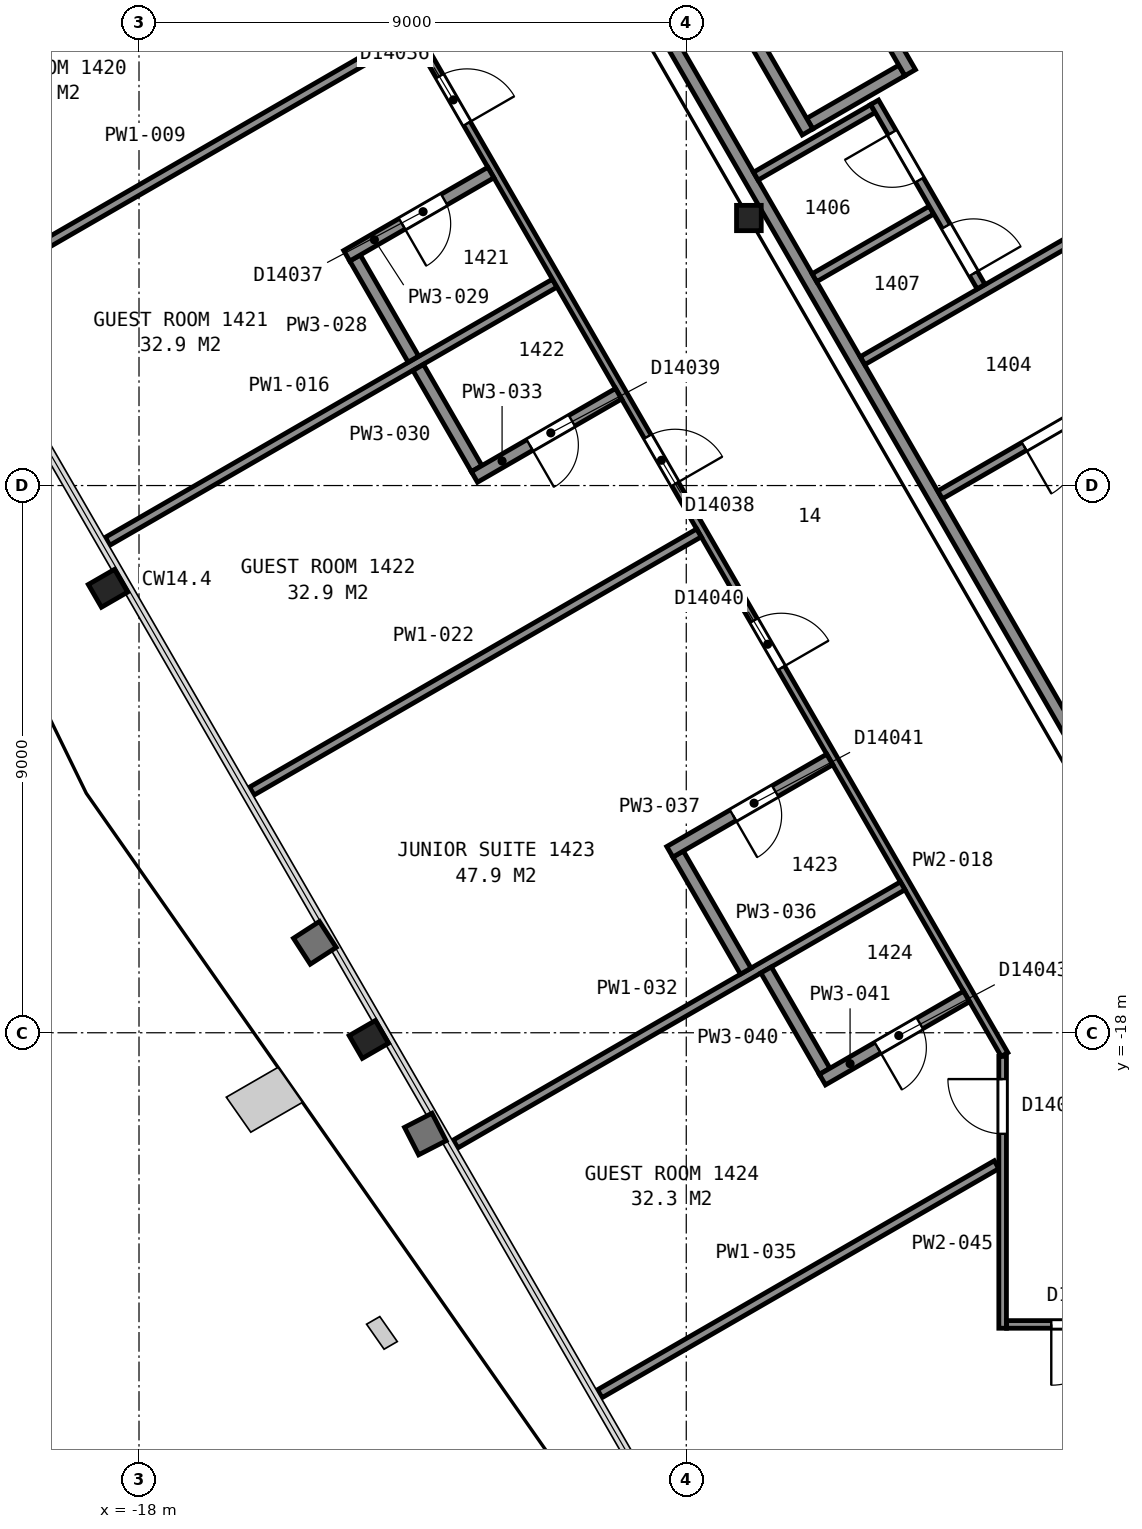
"""IFC4 building model, lengths in metres.
Left out: names, types, materials, properties, quantities, classifications, styles, units other than length and angle.
Written with IfcOpenShell. Run it as: python <this file> out.ifc"""

import sys

from ifc_helpers import new_model, si_unit, direction, frame, frame_2d, origin, origin_2d, place, context, subcontext, project, spatial, rectangle, i_section, extrude, element, fill, save


model = new_model("IFC4")
c1 = context("Model", 3, precision=1e-05, world=origin(), true_north=direction((0.0, 1.0)))
c2 = subcontext(c1, "Body", "Model", "MODEL_VIEW")
j1 = project(units=[si_unit("LENGTHUNIT", "METRE"), si_unit("PLANEANGLEUNIT", "RADIAN")], contexts=[c1])
p1 = place(None, origin())
s1 = spatial("IfcSite", under=j1, at=p1, CompositionType="ELEMENT")
p2 = place(p1, origin())
s2 = spatial("IfcBuilding", under=s1, at=p2, CompositionType="ELEMENT")
p3 = place(p2, frame((0.0, 0.0, 65.6)))
s3 = spatial("IfcBuildingStorey", under=s2, at=p3, CompositionType="ELEMENT", Elevation=65.6)
for number, where, z_axis, x_axis in (
    (1, (-18.51, -10.69, 0.025), (0.0, 0.0, 1.0), (-0.5, 0.866, 0.0)),
    (2, (-14.22, -18.11, 0.025), (0.0, 0.0, 1.0), (-0.5, 0.866, 0.0)),
):
    element("IfcColumn", number, at=place(p3, frame(where, z_axis=z_axis, x_axis=x_axis)), inside=s3, PredefinedType="COLUMN", context=c2, shape_type="SweptSolid", body=[
        extrude(i_section(OverallWidth=0.432, OverallDepth=0.498, WebThickness=0.056, FlangeThickness=0.089, FilletRadius=0.015, at=origin_2d()), origin(), (0.0, 0.0, 1.0), 3.575),
    ])
p4 = place(p3, frame((-7.97, -4.6, 0.0), z_axis=(0.0, 0.0, 1.0), x_axis=(1.0, 0.0, 0.0)))
e3 = element("IfcColumn", 3, at=p4, inside=s3, PredefinedType="COLUMN", context=c2, shape_type="SweptSolid", body=[
    extrude(i_section(OverallWidth=0.406, OverallDepth=0.417, WebThickness=0.03, FlangeThickness=0.048, FilletRadius=0.015, at=origin_2d()), origin(), (0.0, 0.0, 1.0), 3.6),
])
p5 = place(p3, frame((-6.97, -3.048, 0.0), z_axis=(0.0, 0.0, 1.0), x_axis=(0.866036909293, 0.499980071345, 0.0)))
e4 = element("IfcWall", 4, at=p5, inside=s3, PredefinedType="PARTITIONING", context=c2, shape_type="SweptSolid", body=[
    extrude(rectangle(XDim=1.75, YDim=0.2, at=frame_2d((0.875, 0.0))), origin(), (0.0, 0.0, 1.0), 3.6),
])
p6 = place(p3, frame((-5.318, -2.21, 0.0), z_axis=(0.0, 0.0, 1.0), x_axis=(-0.499938297808, 0.866061024631, 0.0)))
e5 = element("IfcWall", 5, at=p6, inside=s3, PredefinedType="PARTITIONING", context=c2, shape_type="SweptSolid", body=[
    extrude(rectangle(XDim=2.35, YDim=0.2, at=frame_2d((1.175, 0.0))), origin(), (0.0, 0.0, 1.0), 3.6),
])
p7 = place(p3, frame((-7.006, -3.185, 0.0), z_axis=(0.0, 0.0, 1.0), x_axis=(-0.499990435942, 0.866030925526, 0.0)))
e6 = element("IfcWall", 6, at=p7, inside=s3, PredefinedType="PARTITIONING", context=c2, shape_type="SweptSolid", body=[
    extrude(rectangle(XDim=2.55, YDim=0.2, at=frame_2d((1.275, 0.0))), origin(), (0.0, 0.0, 1.0), 3.6),
])
p8 = place(p3, frame((-13.664, 5.946, 0.0), z_axis=(0.0, 0.0, 1.0), x_axis=(0.499994327219, -0.866028678941, 0.0)))
e7 = element("IfcWall", 7, at=p8, inside=s3, PredefinedType="PARTITIONING", context=c2, shape_type="SweptSolid", body=[
    extrude(rectangle(XDim=23.968, YDim=0.2, at=frame_2d((11.984, 0.0))), origin(), (0.0, 0.0, 1.0), 3.35),
])
p9 = place(p3, frame((-7.856, -3.912, 0.0), z_axis=(0.0, 0.0, 1.0), x_axis=(0.865971748, 0.500092923031, 0.0)))
e8 = element("IfcWall", 8, at=p9, inside=s3, PredefinedType="PARTITIONING", context=c2, shape_type="SweptSolid", body=[
    extrude(rectangle(XDim=2.225, YDim=0.15, at=frame_2d((1.112, 0.0))), origin(), (0.0, 0.0, 1.0), 3.35),
])
p10 = place(p3, frame((-6.892, -5.582, 0.0), z_axis=(0.0, 0.0, 1.0), x_axis=(0.865944298464, 0.500140452231, 0.0)))
e9 = element("IfcWall", 9, at=p10, inside=s3, PredefinedType="PARTITIONING", context=c2, shape_type="SweptSolid", body=[
    extrude(rectangle(XDim=2.224, YDim=0.15, at=frame_2d((1.112, 0.0))), origin(), (0.0, 0.0, 1.0), 3.35),
])
p11 = place(p3, frame((-6.1, -6.946, 0.0), z_axis=(0.0, 0.0, 1.0), x_axis=(0.866038200431, 0.499977834903, 0.0)))
e10 = element("IfcWall", 10, at=p11, inside=s3, PredefinedType="PARTITIONING", context=c2, shape_type="SweptSolid", body=[
    extrude(rectangle(XDim=4.22, YDim=0.15, at=frame_2d((2.11, 0.0))), origin(), (0.0, 0.0, 1.0), 3.35),
])
p12 = place(p3, frame((-4.152, -5.729, 0.0), z_axis=(0.0, 0.0, 1.0), x_axis=(-0.500024287448, 0.866011380966, 0.0)))
e11 = element("IfcWall", 11, at=p12, inside=s3, PredefinedType="PARTITIONING", context=c2, shape_type="SweptSolid", body=[
    extrude(rectangle(XDim=3.501, YDim=0.15, at=frame_2d((1.75, 0.0))), origin(), (0.0, 0.0, 1.0), 3.35),
])
p13 = place(p12, frame((2.026, 0.0, 0.0)))
e12 = element("IfcOpeningElement", 12, at=p13, cuts=e11, PredefinedType="OPENING", context=c2, shape_type="SweptSolid", body=[
    extrude(rectangle(XDim=0.9, YDim=2.1, at=frame_2d((0.45, 1.05))), frame((0.0, 0.085, 0.0), z_axis=(0.0, -1.0, 0.0), x_axis=(1.0, 0.0, 0.0)), (0.0, 0.0, 1.0), 0.17),
])
p14 = place(p12, frame((0.248, 0.0, 0.0)))
e13 = element("IfcOpeningElement", 13, at=p14, cuts=e11, PredefinedType="OPENING", context=c2, shape_type="SweptSolid", body=[
    extrude(rectangle(XDim=0.9, YDim=2.1, at=frame_2d((0.45, 1.05))), frame((0.0, 0.085, 0.0), z_axis=(0.0, -1.0, 0.0), x_axis=(1.0, 0.0, 0.0)), (0.0, 0.0, 1.0), 0.17),
])
p15 = place(p3, frame((-4.825, -9.154, 0.0), z_axis=(0.0, 0.0, 1.0), x_axis=(0.866023738697, 0.500002884005, 0.0)))
e14 = element("IfcWall", 14, at=p15, inside=s3, PredefinedType="PARTITIONING", context=c2, shape_type="SweptSolid", body=[
    extrude(rectangle(XDim=4.22, YDim=0.15, at=frame_2d((2.11, 0.0))), origin(), (0.0, 0.0, 1.0), 3.35),
])
p16 = place(p15, frame((1.595, 0.0, 0.0)))
e15 = element("IfcOpeningElement", 15, at=p16, cuts=e14, PredefinedType="OPENING", context=c2, shape_type="SweptSolid", body=[
    extrude(rectangle(XDim=0.9, YDim=2.1, at=frame_2d((0.45, 1.05))), frame((0.0, 0.085, 0.0), z_axis=(0.0, -1.0, 0.0), x_axis=(1.0, 0.0, 0.0)), (0.0, 0.0, 1.0), 0.17),
])
p17 = place(p3, frame((-20.889, -5.809, 0.0), z_axis=(0.0, 0.0, 1.0), x_axis=(0.866022790583, 0.50000452617, 0.0)))
e16 = element("IfcWall", 16, at=p17, inside=s3, PredefinedType="PARTITIONING", context=c2, shape_type="SweptSolid", body=[
    extrude(rectangle(XDim=8.491, YDim=0.15, at=frame_2d((4.246, 0.0))), origin(), (0.0, 0.0, 1.0), 2.613),
])
p18 = place(p3, frame((-18.517, -9.917, 0.0), z_axis=(0.0, 0.0, 1.0), x_axis=(0.866017528739, 0.50001363973, 0.0)))
e17 = element("IfcWall", 17, at=p18, inside=s3, PredefinedType="PARTITIONING", context=c2, shape_type="SweptSolid", body=[
    extrude(rectangle(XDim=8.491, YDim=0.15, at=frame_2d((4.246, 0.0))), origin(), (0.0, 0.0, 1.0), 2.613),
])
p19 = place(p3, frame((-3.766, -18.358, 0.0), z_axis=(0.0, 0.0, 1.0), x_axis=(-0.500003973642, 0.866023109589, 0.0)))
e18 = element("IfcWall", 18, at=p19, inside=s3, PredefinedType="PARTITIONING", context=c2, shape_type="SweptSolid", body=[
    extrude(rectangle(XDim=28.826, YDim=0.125, at=frame_2d((14.413, 0.0))), origin(), (0.0, 0.0, 1.0), 2.613),
])
p20 = place(p19, frame((27.114, 0.0, 0.0)))
e19 = element("IfcOpeningElement", 19, at=p20, cuts=e18, PredefinedType="OPENING", context=c2, shape_type="SweptSolid", body=[
    extrude(rectangle(XDim=0.9, YDim=2.1, at=frame_2d((0.45, 1.05))), frame((0.0, 0.073, 0.0), z_axis=(0.0, -1.0, 0.0), x_axis=(1.0, 0.0, 0.0)), (0.0, 0.0, 1.0), 0.145),
])
p21 = place(p19, frame((20.322, 0.0, 0.0)))
e20 = element("IfcOpeningElement", 20, at=p21, cuts=e18, PredefinedType="OPENING", context=c2, shape_type="SweptSolid", body=[
    extrude(rectangle(XDim=0.9, YDim=2.1, at=frame_2d((0.45, 1.05))), frame((0.0, 0.073, 0.0), z_axis=(0.0, -1.0, 0.0), x_axis=(1.0, 0.0, 0.0)), (0.0, 0.0, 1.0), 0.145),
])
p22 = place(p19, frame((17.68, 0.0, 0.0)))
e21 = element("IfcOpeningElement", 21, at=p22, cuts=e18, PredefinedType="OPENING", context=c2, shape_type="SweptSolid", body=[
    extrude(rectangle(XDim=0.9, YDim=2.1, at=frame_2d((0.45, 1.05))), frame((0.0, 0.073, 0.0), z_axis=(0.0, -1.0, 0.0), x_axis=(1.0, 0.0, 0.0)), (0.0, 0.0, 1.0), 0.145),
])
p23 = place(p19, frame((10.836, 0.0, 0.0)))
e22 = element("IfcOpeningElement", 22, at=p23, cuts=e18, PredefinedType="OPENING", context=c2, shape_type="SweptSolid", body=[
    extrude(rectangle(XDim=0.9, YDim=2.1, at=frame_2d((0.45, 1.05))), frame((0.0, 0.073, 0.0), z_axis=(0.0, -1.0, 0.0), x_axis=(1.0, 0.0, 0.0)), (0.0, 0.0, 1.0), 0.145),
])
p24 = place(p19, frame((7.342, 0.0, 0.0)))
e23 = element("IfcOpeningElement", 23, at=p24, cuts=e18, PredefinedType="OPENING", context=c2, shape_type="SweptSolid", body=[
    extrude(rectangle(XDim=0.9, YDim=2.1, at=frame_2d((0.45, 1.05))), frame((0.0, 0.073, 0.0), z_axis=(0.0, -1.0, 0.0), x_axis=(1.0, 0.0, 0.0)), (0.0, 0.0, 1.0), 0.145),
])
p25 = place(p3, frame((-16.145, -14.025, 0.0), z_axis=(0.0, 0.0, 1.0), x_axis=(0.866024716685, 0.500001190089, 0.0)))
e24 = element("IfcWall", 24, at=p25, inside=s3, PredefinedType="PARTITIONING", context=c2, shape_type="SweptSolid", body=[
    extrude(rectangle(XDim=8.492, YDim=0.15, at=frame_2d((4.246, 0.0))), origin(), (0.0, 0.0, 1.0), 2.613),
])
p26 = place(p3, frame((-14.447, -5.258, 0.0), z_axis=(0.0, 0.0, 1.0), x_axis=(0.499667418833, -0.866217334482, 0.0)))
e25 = element("IfcWall", 25, at=p26, inside=s3, PredefinedType="PARTITIONING", context=c2, shape_type="SweptSolid", body=[
    extrude(rectangle(XDim=1.92, YDim=0.2, at=frame_2d((0.96, 0.0))), origin(), (0.0, 0.0, 1.0), 2.613),
])
p27 = place(p3, frame((-12.213, -3.852, 0.0), z_axis=(0.0, 0.0, 1.0), x_axis=(-0.866005850709, -0.50003386539, 0.0)))
e26 = element("IfcWall", 26, at=p27, inside=s3, PredefinedType="PARTITIONING", context=c2, shape_type="SweptSolid", body=[
    extrude(rectangle(XDim=2.737, YDim=0.2, at=frame_2d((1.369, 0.0))), origin(), (0.0, 0.0, 1.0), 2.613),
])
p28 = place(p27, frame((0.887, 0.0, 0.0)))
e27 = element("IfcOpeningElement", 27, at=p28, cuts=e26, PredefinedType="OPENING", context=c2, shape_type="SweptSolid", body=[
    extrude(rectangle(XDim=0.8, YDim=2.1, at=frame_2d((0.4, 1.05))), frame((0.0, 0.11, 0.0), z_axis=(0.0, -1.0, 0.0), x_axis=(1.0, 0.0, 0.0)), (0.0, 0.0, 1.0), 0.22),
])
p29 = place(p3, frame((-13.407, -7.059, 0.0), z_axis=(0.0, 0.0, 1.0), x_axis=(0.499993829411, -0.866028966346, 0.0)))
e28 = element("IfcWall", 28, at=p29, inside=s3, PredefinedType="PARTITIONING", context=c2, shape_type="SweptSolid", body=[
    extrude(rectangle(XDim=1.921, YDim=0.2, at=frame_2d((0.96, 0.0))), origin(), (0.0, 0.0, 1.0), 2.613),
])
p30 = place(p3, frame((-12.794, -19.829, 0.0), z_axis=(0.0, 0.0, 1.0), x_axis=(0.866024716685, 0.500001190089, 0.0)))
e29 = element("IfcWall", 29, at=p30, inside=s3, PredefinedType="PARTITIONING", context=c2, shape_type="SweptSolid", body=[
    extrude(rectangle(XDim=8.492, YDim=0.15, at=frame_2d((4.246, 0.0))), origin(), (0.0, 0.0, 1.0), 2.613),
])
p31 = place(p3, frame((-12.484, -8.859, 0.0), z_axis=(0.0, 0.0, 1.0), x_axis=(0.866028150195, 0.499995243048, 0.0)))
e30 = element("IfcWall", 30, at=p31, inside=s3, PredefinedType="PARTITIONING", context=c2, shape_type="SweptSolid", body=[
    extrude(rectangle(XDim=2.737, YDim=0.2, at=frame_2d((1.369, 0.0))), origin(), (0.0, 0.0, 1.0), 2.613),
])
p32 = place(p31, frame((1.05, 0.0, 0.0)))
e31 = element("IfcOpeningElement", 31, at=p32, cuts=e30, PredefinedType="OPENING", context=c2, shape_type="SweptSolid", body=[
    extrude(rectangle(XDim=0.8, YDim=2.1, at=frame_2d((0.4, 1.05))), frame((0.0, 0.11, 0.0), z_axis=(0.0, -1.0, 0.0), x_axis=(1.0, 0.0, 0.0)), (0.0, 0.0, 1.0), 0.22),
])
p33 = place(p3, frame((-10.423, -23.937, 0.0), z_axis=(0.0, 0.0, 1.0), x_axis=(0.866039368072, 0.499975812365, 0.0)))
e32 = element("IfcWall", 32, at=p33, inside=s3, PredefinedType="PARTITIONING", context=c2, shape_type="SweptSolid", body=[
    extrude(rectangle(XDim=7.535, YDim=0.15, at=frame_2d((3.768, 0.0))), origin(), (0.0, 0.0, 1.0), 2.613),
])
p34 = place(p3, frame((-9.134, -15.061, 0.0), z_axis=(0.0, 0.0, 1.0), x_axis=(0.500092923031, -0.865971748, 0.0)))
e33 = element("IfcWall", 33, at=p34, inside=s3, PredefinedType="PARTITIONING", context=c2, shape_type="SweptSolid", body=[
    extrude(rectangle(XDim=2.225, YDim=0.2, at=frame_2d((1.112, 0.0))), origin(), (0.0, 0.0, 1.0), 2.613),
])
p35 = place(p3, frame((-6.64, -13.505, 0.0), z_axis=(0.0, 0.0, 1.0), x_axis=(-0.866038344573, -0.499977585228, 0.0)))
e34 = element("IfcWall", 34, at=p35, inside=s3, PredefinedType="PARTITIONING", context=c2, shape_type="SweptSolid", body=[
    extrude(rectangle(XDim=3.037, YDim=0.2, at=frame_2d((1.519, 0.0))), origin(), (0.0, 0.0, 1.0), 2.613),
])
p36 = place(p35, frame((1.037, 0.0, 0.0)))
e35 = element("IfcOpeningElement", 35, at=p36, cuts=e34, PredefinedType="OPENING", context=c2, shape_type="SweptSolid", body=[
    extrude(rectangle(XDim=0.8, YDim=2.1, at=frame_2d((0.4, 1.05))), frame((0.0, 0.11, 0.0), z_axis=(0.0, -1.0, 0.0), x_axis=(1.0, 0.0, 0.0)), (0.0, 0.0, 1.0), 0.22),
])
p37 = place(p3, frame((-7.687, -16.967, 0.0), z_axis=(0.0, 0.0, 1.0), x_axis=(0.500026156197, -0.86601030197, 0.0)))
e36 = element("IfcWall", 36, at=p37, inside=s3, PredefinedType="PARTITIONING", context=c2, shape_type="SweptSolid", body=[
    extrude(rectangle(XDim=1.925, YDim=0.2, at=frame_2d((0.963, 0.0))), origin(), (0.0, 0.0, 1.0), 2.613),
])
p38 = place(p3, frame((-6.76, -18.771, 0.0), z_axis=(0.0, 0.0, 1.0), x_axis=(0.866005850709, 0.50003386539, 0.0)))
e37 = element("IfcWall", 37, at=p38, inside=s3, PredefinedType="PARTITIONING", context=c2, shape_type="SweptSolid", body=[
    extrude(rectangle(XDim=2.737, YDim=0.2, at=frame_2d((1.369, 0.0))), origin(), (0.0, 0.0, 1.0), 2.613),
])
p39 = place(p38, frame((1.05, 0.0, 0.0)))
e38 = element("IfcOpeningElement", 38, at=p39, cuts=e37, PredefinedType="OPENING", context=c2, shape_type="SweptSolid", body=[
    extrude(rectangle(XDim=0.8, YDim=2.1, at=frame_2d((0.4, 1.05))), frame((0.0, 0.11, 0.0), z_axis=(0.0, -1.0, 0.0), x_axis=(1.0, 0.0, 0.0)), (0.0, 0.0, 1.0), 0.22),
])
p40 = place(p3, frame((-3.797, -22.86, 0.0), z_axis=(0.0, 0.0, 1.0), x_axis=(0.0, 1.0, 0.0)))
e39 = element("IfcWall", 39, at=p40, inside=s3, PredefinedType="PARTITIONING", context=c2, shape_type="SweptSolid", body=[
    extrude(rectangle(XDim=4.471, YDim=0.125, at=frame_2d((2.235, 0.0))), origin(), (0.0, 0.0, 1.0), 2.613),
])
p41 = place(p40, frame((3.198, 0.0, 0.0)))
e40 = element("IfcOpeningElement", 40, at=p41, cuts=e39, PredefinedType="OPENING", context=c2, shape_type="SweptSolid", body=[
    extrude(rectangle(XDim=0.9, YDim=2.1, at=frame_2d((0.45, 1.05))), frame((0.0, 0.073, 0.0), z_axis=(0.0, -1.0, 0.0), x_axis=(1.0, 0.0, 0.0)), (0.0, 0.0, 1.0), 0.145),
])
p42 = place(p3, frame((-1.14, -22.797, 0.0), z_axis=(0.0, 0.0, 1.0), x_axis=(-1.0, 0.0, 0.0)))
e41 = element("IfcWall", 41, at=p42, inside=s3, PredefinedType="PARTITIONING", context=c2, shape_type="SweptSolid", body=[
    extrude(rectangle(XDim=2.592, YDim=0.125, at=frame_2d((1.296, 0.0))), origin(), (0.0, 0.0, 1.0), 2.613),
])
p43 = place(p42, frame((0.856, 0.0, 0.0)))
e42 = element("IfcOpeningElement", 42, at=p43, cuts=e41, PredefinedType="OPENING", context=c2, shape_type="SweptSolid", body=[
    extrude(rectangle(XDim=1.0, YDim=2.1, at=frame_2d((0.5, 1.05))), frame((0.0, 0.073, 0.0), z_axis=(0.0, -1.0, 0.0), x_axis=(1.0, 0.0, 0.0)), (0.0, 0.0, 1.0), 0.145),
])
p44 = place(p13, origin())
e43 = element("IfcDoor", 43, at=p44, inside=s3, OperationType="SINGLE_SWING_RIGHT", PredefinedType="DOOR", context=c2, shape_type="SweptSolid", body=[
    extrude(rectangle(XDim=0.9, YDim=2.1, at=frame_2d((0.45, 1.05))), frame((0.0, 0.025, 0.0), z_axis=(0.0, -1.0, 0.0), x_axis=(1.0, 0.0, 0.0)), (0.0, 0.0, 1.0), 0.05),
])
fill(e12, e43)
p45 = place(p14, origin())
e44 = element("IfcDoor", 44, at=p45, inside=s3, OperationType="SINGLE_SWING_LEFT", PredefinedType="DOOR", context=c2, shape_type="SweptSolid", body=[
    extrude(rectangle(XDim=0.9, YDim=2.1, at=frame_2d((0.45, 1.05))), frame((0.0, 0.025, 0.0), z_axis=(0.0, -1.0, 0.0), x_axis=(1.0, 0.0, 0.0)), (0.0, 0.0, 1.0), 0.05),
])
fill(e13, e44)
p46 = place(p16, origin())
e45 = element("IfcDoor", 45, at=p46, inside=s3, OperationType="SINGLE_SWING_LEFT", PredefinedType="DOOR", context=c2, shape_type="SweptSolid", body=[
    extrude(rectangle(XDim=0.9, YDim=2.1, at=frame_2d((0.45, 1.05))), frame((0.0, 0.025, 0.0), z_axis=(0.0, -1.0, 0.0), x_axis=(1.0, 0.0, 0.0)), (0.0, 0.0, 1.0), 0.05),
])
fill(e15, e45)
p47 = place(p22, origin())
e46 = element("IfcDoor", 46, at=p47, inside=s3, OperationType="SINGLE_SWING_LEFT", PredefinedType="DOOR", context=c2, shape_type="SweptSolid", body=[
    extrude(rectangle(XDim=0.9, YDim=2.1, at=frame_2d((0.45, 1.05))), frame((0.0, 0.025, 0.0), z_axis=(0.0, -1.0, 0.0), x_axis=(1.0, 0.0, 0.0)), (0.0, 0.0, 1.0), 0.05),
])
fill(e21, e46)
p48 = place(p23, origin())
e47 = element("IfcDoor", 47, at=p48, inside=s3, OperationType="SINGLE_SWING_LEFT", PredefinedType="DOOR", context=c2, shape_type="SweptSolid", body=[
    extrude(rectangle(XDim=0.9, YDim=2.1, at=frame_2d((0.45, 1.05))), frame((0.0, 0.025, 0.0), z_axis=(0.0, -1.0, 0.0), x_axis=(1.0, 0.0, 0.0)), (0.0, 0.0, 1.0), 0.05),
])
fill(e22, e47)
p49 = place(p24, origin())
e48 = element("IfcDoor", 48, at=p49, inside=s3, OperationType="SINGLE_SWING_LEFT", PredefinedType="DOOR", context=c2, shape_type="SweptSolid", body=[
    extrude(rectangle(XDim=0.9, YDim=2.1, at=frame_2d((0.45, 1.05))), frame((0.0, 0.025, 0.0), z_axis=(0.0, -1.0, 0.0), x_axis=(1.0, 0.0, 0.0)), (0.0, 0.0, 1.0), 0.05),
])
fill(e23, e48)
p50 = place(p28, origin())
e49 = element("IfcDoor", 49, at=p50, inside=s3, OperationType="SINGLE_SWING_RIGHT", PredefinedType="DOOR", context=c2, shape_type="SweptSolid", body=[
    extrude(rectangle(XDim=0.8, YDim=2.1, at=frame_2d((0.4, 1.05))), frame((0.0, 0.025, 0.0), z_axis=(0.0, -1.0, 0.0), x_axis=(1.0, 0.0, 0.0)), (0.0, 0.0, 1.0), 0.05),
])
fill(e27, e49)
p51 = place(p32, origin())
e50 = element("IfcDoor", 50, at=p51, inside=s3, OperationType="SINGLE_SWING_LEFT", PredefinedType="DOOR", context=c2, shape_type="SweptSolid", body=[
    extrude(rectangle(XDim=0.8, YDim=2.1, at=frame_2d((0.4, 1.05))), frame((0.0, 0.025, 0.0), z_axis=(0.0, -1.0, 0.0), x_axis=(1.0, 0.0, 0.0)), (0.0, 0.0, 1.0), 0.05),
])
fill(e31, e50)
p52 = place(p36, origin())
e51 = element("IfcDoor", 51, at=p52, inside=s3, OperationType="SINGLE_SWING_RIGHT", PredefinedType="DOOR", context=c2, shape_type="SweptSolid", body=[
    extrude(rectangle(XDim=0.8, YDim=2.1, at=frame_2d((0.4, 1.05))), frame((0.0, 0.025, 0.0), z_axis=(0.0, -1.0, 0.0), x_axis=(1.0, 0.0, 0.0)), (0.0, 0.0, 1.0), 0.05),
])
fill(e35, e51)
p53 = place(p39, origin())
e52 = element("IfcDoor", 52, at=p53, inside=s3, OperationType="SINGLE_SWING_LEFT", PredefinedType="DOOR", context=c2, shape_type="SweptSolid", body=[
    extrude(rectangle(XDim=0.8, YDim=2.1, at=frame_2d((0.4, 1.05))), frame((0.0, 0.025, 0.0), z_axis=(0.0, -1.0, 0.0), x_axis=(1.0, 0.0, 0.0)), (0.0, 0.0, 1.0), 0.05),
])
fill(e38, e52)
p54 = place(p41, origin())
e53 = element("IfcDoor", 53, at=p54, inside=s3, OperationType="SINGLE_SWING_RIGHT", PredefinedType="DOOR", context=c2, shape_type="SweptSolid", body=[
    extrude(rectangle(XDim=0.9, YDim=2.1, at=frame_2d((0.45, 1.05))), frame((0.0, 0.025, 0.0), z_axis=(0.0, -1.0, 0.0), x_axis=(1.0, 0.0, 0.0)), (0.0, 0.0, 1.0), 0.05),
])
fill(e40, e53)
p55 = place(p43, origin())
e54 = element("IfcDoor", 54, at=p55, inside=s3, OperationType="SINGLE_SWING_RIGHT", PredefinedType="DOOR", context=c2, shape_type="SweptSolid", body=[
    extrude(rectangle(XDim=1.0, YDim=2.1, at=frame_2d((0.5, 1.05))), frame((0.0, 0.025, 0.0), z_axis=(0.0, -1.0, 0.0), x_axis=(1.0, 0.0, 0.0)), (0.0, 0.0, 1.0), 0.05),
])
fill(e42, e54)
save(model, sys.argv[1])
